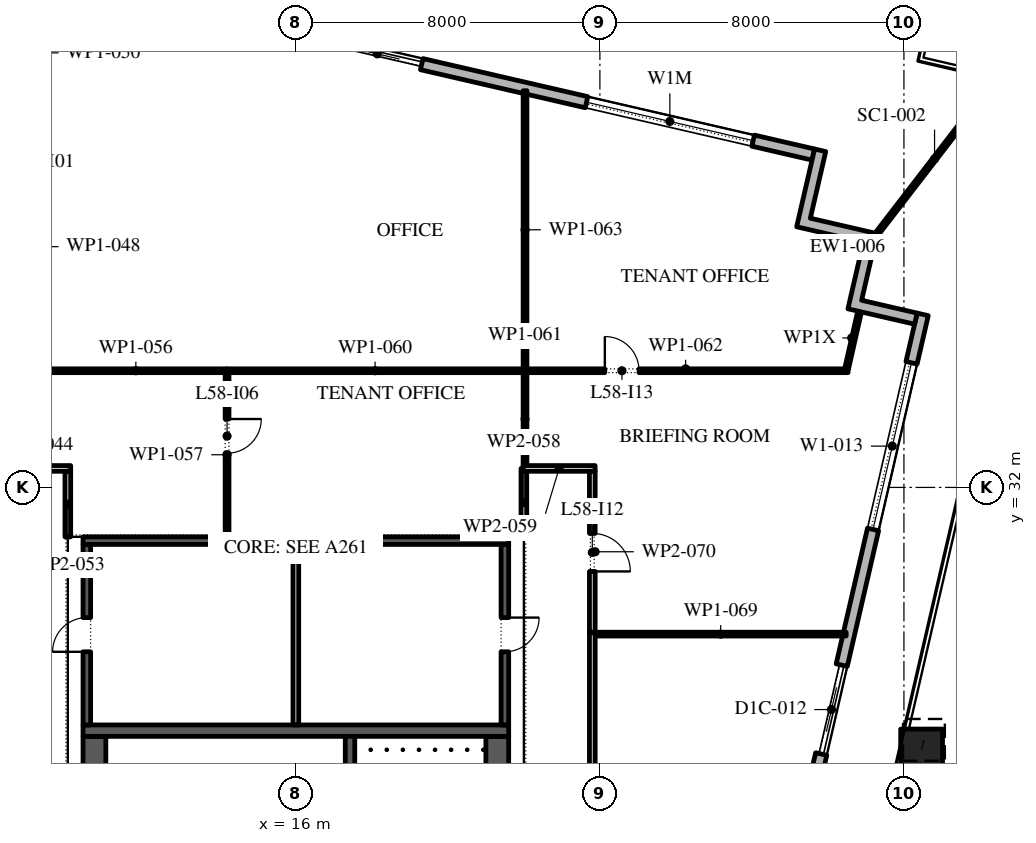
"""IFC4 building model, lengths in metres.
Left out: names, types, materials, properties, quantities, classifications, styles, units other than length and angle.
Written with IfcOpenShell. Run it as: python <this file> out.ifc"""

import sys

from ifc_helpers import new_model, si_unit, direction, frame, frame_2d, origin, origin_2d, place, context, subcontext, project, spatial, polyline, rectangle, outline, extrude, element, fill, save


model = new_model("IFC4")
c1 = context("Model", 3, precision=1e-05, world=origin(), true_north=direction((0.0, 1.0)))
c2 = subcontext(c1, "Body", "Model", "MODEL_VIEW")
j1 = project(units=[si_unit("LENGTHUNIT", "METRE"), si_unit("PLANEANGLEUNIT", "RADIAN")], contexts=[c1])
p1 = place(None, origin())
s1 = spatial("IfcSite", under=j1, at=p1, CompositionType="ELEMENT")
p2 = place(p1, origin())
s2 = spatial("IfcBuilding", under=s1, at=p2, CompositionType="ELEMENT")
p3 = place(p2, frame((0.0, 0.0, 268.2)))
s3 = spatial("IfcBuildingStorey", under=s2, at=p3, CompositionType="ELEMENT", Elevation=268.2)
p4 = place(p3, frame((32.465, 25.092, 0.0), z_axis=(0.014617783326, 0.063169706518, 0.99789574034), x_axis=(-0.974255315496, 0.225447511024, 0.0)))
e1 = element("IfcColumn", 1, at=p4, inside=s3, PredefinedType="COLUMN", context=c2, shape_type="SweptSolid", body=[
    extrude(rectangle(XDim=1.1, YDim=1.1, at=origin_2d()), origin(), (0.0, 0.0, 1.0), 4.209),
])
p5 = place(p3, frame((21.359, -11.678, 0.0), z_axis=(0.0, 0.0, 1.0), x_axis=(0.224949198343, 0.974370493275, 0.0)))
e2 = element("IfcWall", 2, at=p5, inside=s3, PredefinedType="STANDARD", context=c2, shape_type="SweptSolid", body=[
    extrude(rectangle(XDim=49.5, YDim=0.3, at=frame_2d((24.75, 0.0))), origin(), (0.0, 0.0, 1.0), 4.0),
])
p6 = place(p5, frame((1.157, 0.0, 0.45)))
e3 = element("IfcOpeningElement", 3, at=p6, cuts=e2, PredefinedType="OPENING", context=c2, shape_type="SweptSolid", body=[
    extrude(rectangle(XDim=4.5, YDim=3.05, at=frame_2d((2.25, 1.525))), frame((0.0, 0.16, 0.0), z_axis=(0.0, -1.0, 0.0), x_axis=(1.0, 0.0, 0.0)), (0.0, 0.0, 1.0), 0.32),
])
p7 = place(p5, frame((8.121, 0.0, 0.45)))
e4 = element("IfcOpeningElement", 4, at=p7, cuts=e2, PredefinedType="OPENING", context=c2, shape_type="SweptSolid", body=[
    extrude(rectangle(XDim=4.5, YDim=3.05, at=frame_2d((2.25, 1.525))), frame((0.0, 0.16, 0.0), z_axis=(0.0, -1.0, 0.0), x_axis=(1.0, 0.0, 0.0)), (0.0, 0.0, 1.0), 0.32),
])
p8 = place(p5, frame((15.236, 0.0, 0.45)))
e5 = element("IfcOpeningElement", 5, at=p8, cuts=e2, PredefinedType="OPENING", context=c2, shape_type="SweptSolid", body=[
    extrude(rectangle(XDim=4.5, YDim=3.05, at=frame_2d((2.25, 1.525))), frame((0.0, 0.16, 0.0), z_axis=(0.0, -1.0, 0.0), x_axis=(1.0, 0.0, 0.0)), (0.0, 0.0, 1.0), 0.32),
])
p9 = place(p5, frame((22.35, 0.0, 0.45)))
e6 = element("IfcOpeningElement", 6, at=p9, cuts=e2, PredefinedType="OPENING", context=c2, shape_type="SweptSolid", body=[
    extrude(rectangle(XDim=4.5, YDim=3.05, at=frame_2d((2.25, 1.525))), frame((0.0, 0.16, 0.0), z_axis=(0.0, -1.0, 0.0), x_axis=(1.0, 0.0, 0.0)), (0.0, 0.0, 1.0), 0.32),
])
p10 = place(p5, frame((29.464, 0.0, 0.45)))
e7 = element("IfcOpeningElement", 7, at=p10, cuts=e2, PredefinedType="OPENING", context=c2, shape_type="SweptSolid", body=[
    extrude(rectangle(XDim=4.5, YDim=2.95, at=frame_2d((2.25, 1.475))), frame((0.0, 0.16, 0.0), z_axis=(0.0, -1.0, 0.0), x_axis=(1.0, 0.0, 0.0)), (0.0, 0.0, 1.0), 0.32),
])
p11 = place(p5, frame((37.628, 0.0, 0.0)))
e8 = element("IfcOpeningElement", 8, at=p11, cuts=e2, PredefinedType="OPENING", context=c2, shape_type="SweptSolid", body=[
    extrude(rectangle(XDim=2.4, YDim=3.325, at=frame_2d((1.2, 1.663))), frame((0.0, 0.16, 0.0), z_axis=(0.0, -1.0, 0.0), x_axis=(1.0, 0.0, 0.0)), (0.0, 0.0, 1.0), 0.32),
])
p12 = place(p5, frame((43.693, 0.0, 0.45)))
e9 = element("IfcOpeningElement", 9, at=p12, cuts=e2, PredefinedType="OPENING", context=c2, shape_type="SweptSolid", body=[
    extrude(rectangle(XDim=4.5, YDim=3.05, at=frame_2d((2.25, 1.525))), frame((0.0, 0.16, 0.0), z_axis=(0.0, -1.0, 0.0), x_axis=(1.0, 0.0, 0.0)), (0.0, 0.0, 1.0), 0.32),
])
p13 = place(p3, frame((29.616, 40.758, 0.0), z_axis=(0.0, 0.0, 1.0), x_axis=(-0.974370532314, 0.224949029246, 0.0)))
e10 = element("IfcWall", 10, at=p13, inside=s3, PredefinedType="STANDARD", context=c2, shape_type="SweptSolid", body=[
    extrude(rectangle(XDim=48.0, YDim=0.3, at=frame_2d((24.0, 0.0))), origin(), (0.0, 0.0, 1.0), 4.0),
])
p14 = place(p13, frame((1.625, 0.0, 0.45)))
e11 = element("IfcOpeningElement", 11, at=p14, cuts=e10, PredefinedType="OPENING", context=c2, shape_type="SweptSolid", body=[
    extrude(rectangle(XDim=4.5, YDim=2.575, at=frame_2d((2.25, 1.288))), frame((0.0, 0.16, 0.0), z_axis=(0.0, -1.0, 0.0), x_axis=(1.0, 0.0, 0.0)), (0.0, 0.0, 1.0), 0.32),
])
p15 = place(p13, frame((10.575, 0.0, 0.0)))
e12 = element("IfcOpeningElement", 12, at=p15, cuts=e10, PredefinedType="OPENING", context=c2, shape_type="SweptSolid", body=[
    extrude(rectangle(XDim=2.4, YDim=3.5, at=frame_2d((1.2, 1.75))), frame((0.0, 0.16, 0.0), z_axis=(0.0, -1.0, 0.0), x_axis=(1.0, 0.0, 0.0)), (0.0, 0.0, 1.0), 0.32),
])
p16 = place(p13, frame((17.575, 0.0, 0.45)))
e13 = element("IfcOpeningElement", 13, at=p16, cuts=e10, PredefinedType="OPENING", context=c2, shape_type="SweptSolid", body=[
    extrude(rectangle(XDim=4.5, YDim=2.45, at=frame_2d((2.25, 1.225))), frame((0.0, 0.16, 0.0), z_axis=(0.0, -1.0, 0.0), x_axis=(1.0, 0.0, 0.0)), (0.0, 0.0, 1.0), 0.32),
])
p17 = place(p13, frame((25.625, 0.0, 0.45)))
e14 = element("IfcOpeningElement", 14, at=p17, cuts=e10, PredefinedType="OPENING", context=c2, shape_type="SweptSolid", body=[
    extrude(rectangle(XDim=4.5, YDim=2.45, at=frame_2d((2.25, 1.225))), frame((0.0, 0.16, 0.0), z_axis=(0.0, -1.0, 0.0), x_axis=(1.0, 0.0, 0.0)), (0.0, 0.0, 1.0), 0.32),
])
p18 = place(p13, frame((33.675, 0.0, 0.45)))
e15 = element("IfcOpeningElement", 15, at=p18, cuts=e10, PredefinedType="OPENING", context=c2, shape_type="SweptSolid", body=[
    extrude(rectangle(XDim=4.5, YDim=2.45, at=frame_2d((2.25, 1.225))), frame((0.0, 0.16, 0.0), z_axis=(0.0, -1.0, 0.0), x_axis=(1.0, 0.0, 0.0)), (0.0, 0.0, 1.0), 0.32),
])
p19 = place(p13, frame((42.175, 0.0, 0.0)))
e16 = element("IfcOpeningElement", 16, at=p19, cuts=e10, PredefinedType="OPENING", context=c2, shape_type="SweptSolid", body=[
    extrude(rectangle(XDim=2.4, YDim=3.5, at=frame_2d((1.2, 1.75))), frame((0.0, 0.16, 0.0), z_axis=(0.0, -1.0, 0.0), x_axis=(1.0, 0.0, 0.0)), (0.0, 0.0, 1.0), 0.32),
])
p20 = place(p3, origin())
e17 = element("IfcWall", 17, at=p20, inside=s3, PredefinedType="STANDARD", context=c2, shape_type="SweptSolid", body=[
    extrude(outline(polyline([(30.931, 38.453), (29.177, 38.858), (29.65, 40.905), (29.942, 40.837), (29.537, 39.083), (31.291, 38.678), (30.886, 36.924), (32.348, 36.587), (32.28, 36.295), (30.526, 36.699), (30.931, 38.453)])), origin(), (0.0, 0.0, 1.0), 4.0),
])
p21 = place(p3, frame((31.291, 38.678, -0.05), z_axis=(0.0, 0.0, 1.0), x_axis=(0.610487929458, 0.792025560185, 0.0)))
e18 = element("IfcWall", 18, at=p21, inside=s3, PredefinedType="STANDARD", context=c2, shape_type="SweptSolid", body=[
    extrude(rectangle(XDim=4.962, YDim=0.1, at=frame_2d((2.481, 0.0))), origin(), (0.0, 0.0, 1.0), 4.05),
])
p22 = place(p3, frame((21.3, -2.45, 0.0), z_axis=(0.0, 0.0, 1.0), x_axis=(0.0, 1.0, 0.0)))
e19 = element("IfcWall", 19, at=p22, inside=s3, PredefinedType="SHEAR", context=c2, shape_type="SweptSolid", body=[
    extrude(rectangle(XDim=27.9, YDim=0.6, at=frame_2d((13.95, 0.0))), origin(), (0.0, 0.0, 1.0), 4.0),
])
p23 = place(p22, frame((5.05, 0.0, 0.0)))
e20 = element("IfcOpeningElement", 20, at=p23, cuts=e19, PredefinedType="OPENING", context=c2, shape_type="SweptSolid", body=[
    extrude(rectangle(XDim=1.2, YDim=2.1, at=frame_2d((0.6, 1.05))), frame((0.0, 0.31, 0.0), z_axis=(0.0, -1.0, 0.0), x_axis=(1.0, 0.0, 0.0)), (0.0, 0.0, 1.0), 0.62),
])
p24 = place(p22, frame((21.65, 0.0, 0.0)))
e21 = element("IfcOpeningElement", 21, at=p24, cuts=e19, PredefinedType="OPENING", context=c2, shape_type="SweptSolid", body=[
    extrude(rectangle(XDim=1.2, YDim=2.1, at=frame_2d((0.6, 1.05))), frame((0.0, 0.31, 0.0), z_axis=(0.0, -1.0, 0.0), x_axis=(1.0, 0.0, 0.0)), (0.0, 0.0, 1.0), 0.62),
])
p25 = place(p3, frame((10.7, -2.45, 0.0), z_axis=(0.0, 0.0, 1.0), x_axis=(0.0, 1.0, 0.0)))
e22 = element("IfcWall", 22, at=p25, inside=s3, PredefinedType="SHEAR", context=c2, shape_type="SweptSolid", body=[
    extrude(rectangle(XDim=27.9, YDim=0.6, at=frame_2d((13.95, 0.0))), origin(), (0.0, 0.0, 1.0), 4.0),
])
p26 = place(p25, frame((23.65, 0.0, 0.0)))
e23 = element("IfcOpeningElement", 23, at=p26, cuts=e22, PredefinedType="OPENING", context=c2, shape_type="SweptSolid", body=[
    extrude(rectangle(XDim=2.4, YDim=2.1, at=frame_2d((1.2, 1.05))), frame((0.0, 0.31, 0.0), z_axis=(0.0, -1.0, 0.0), x_axis=(1.0, 0.0, 0.0)), (0.0, 0.0, 1.0), 0.62),
])
p27 = place(p25, frame((1.087, 0.0, 0.0)))
e24 = element("IfcOpeningElement", 24, at=p27, cuts=e22, PredefinedType="OPENING", context=c2, shape_type="SweptSolid", body=[
    extrude(rectangle(XDim=0.9, YDim=2.1, at=frame_2d((0.45, 1.05))), frame((0.0, 0.31, 0.0), z_axis=(0.0, -1.0, 0.0), x_axis=(1.0, 0.0, 0.0)), (0.0, 0.0, 1.0), 0.62),
])
p28 = place(p25, frame((4.262, 0.0, 0.0)))
e25 = element("IfcOpeningElement", 25, at=p28, cuts=e22, PredefinedType="OPENING", context=c2, shape_type="SweptSolid", body=[
    extrude(rectangle(XDim=1.0, YDim=2.1, at=frame_2d((0.5, 1.05))), frame((0.0, 0.31, 0.0), z_axis=(0.0, -1.0, 0.0), x_axis=(1.0, 0.0, 0.0)), (0.0, 0.0, 1.0), 0.62),
])
p29 = place(p3, frame((10.4, 25.6, 0.0), z_axis=(0.0, 0.0, 1.0), x_axis=(1.0, 0.0, 0.0)))
e26 = element("IfcWall", 26, at=p29, inside=s3, PredefinedType="SHEAR", context=c2, shape_type="SweptSolid", body=[
    extrude(rectangle(XDim=11.2, YDim=0.3, at=frame_2d((5.6, 0.0))), origin(), (0.0, 0.0, 1.0), 4.0),
])
p30 = place(p3, frame((17.425, 19.15, 0.0), z_axis=(0.0, 0.0, 1.0), x_axis=(0.0, 1.0, 0.0)))
e27 = element("IfcWall", 27, at=p30, inside=s3, PredefinedType="SHEAR", context=c2, shape_type="SweptSolid", body=[
    extrude(rectangle(XDim=6.3, YDim=0.25, at=frame_2d((3.15, 0.0))), origin(), (0.0, 0.0, 1.0), 4.0),
])
p31 = place(p30, frame((0.05, 0.0, 0.0)))
e28 = element("IfcOpeningElement", 28, at=p31, cuts=e27, PredefinedType="OPENING", context=c2, shape_type="SweptSolid", body=[
    extrude(rectangle(XDim=1.2, YDim=2.1, at=frame_2d((0.6, 1.05))), frame((0.0, 0.135, 0.0), z_axis=(0.0, -1.0, 0.0), x_axis=(1.0, 0.0, 0.0)), (0.0, 0.0, 1.0), 0.27),
])
p32 = place(p3, frame((21.5, 25.75, 0.0), z_axis=(0.0, 0.0, 1.0), x_axis=(0.0, 1.0, 0.0)))
e29 = element("IfcWall", 29, at=p32, inside=s3, PredefinedType="SHEAR", context=c2, shape_type="SweptSolid", body=[
    extrude(rectangle(XDim=4.75, YDim=0.2, at=frame_2d((2.375, 0.0))), origin(), (0.0, 0.0, 1.0), 4.0),
])
p33 = place(p32, frame((1.925, 0.0, 0.0)))
e30 = element("IfcOpeningElement", 30, at=p33, cuts=e29, PredefinedType="OPENING", context=c2, shape_type="SweptSolid", body=[
    extrude(rectangle(XDim=0.9, YDim=2.1, at=frame_2d((0.45, 1.05))), frame((0.0, 0.11, 0.0), z_axis=(0.0, -1.0, 0.0), x_axis=(1.0, 0.0, 0.0)), (0.0, 0.0, 1.0), 0.22),
])
p34 = place(p3, frame((10.5, 25.75, 0.0), z_axis=(0.0, 0.0, 1.0), x_axis=(0.0, 1.0, 0.0)))
e31 = element("IfcWall", 31, at=p34, inside=s3, PredefinedType="SHEAR", context=c2, shape_type="SweptSolid", body=[
    extrude(rectangle(XDim=4.75, YDim=0.2, at=frame_2d((2.375, 0.0))), origin(), (0.0, 0.0, 1.0), 4.0),
])
p35 = place(p34, frame((1.925, 0.0, 0.0)))
e32 = element("IfcOpeningElement", 32, at=p35, cuts=e31, PredefinedType="OPENING", context=c2, shape_type="SweptSolid", body=[
    extrude(rectangle(XDim=0.9, YDim=2.1, at=frame_2d((0.45, 1.05))), frame((0.0, 0.11, 0.0), z_axis=(0.0, -1.0, 0.0), x_axis=(1.0, 0.0, 0.0)), (0.0, 0.0, 1.0), 0.22),
])
p36 = place(p3, frame((10.4, 30.6, 0.0), z_axis=(0.0, 0.0, 1.0), x_axis=(1.0, 0.0, 0.0)))
e33 = element("IfcWall", 33, at=p36, inside=s3, PredefinedType="SHEAR", context=c2, shape_type="SweptSolid", body=[
    extrude(rectangle(XDim=11.2, YDim=0.2, at=frame_2d((5.6, 0.0))), origin(), (0.0, 0.0, 1.0), 4.0),
])
p37 = place(p3, frame((16.0, 25.75, 0.0), z_axis=(0.0, 0.0, 1.0), x_axis=(0.0, 1.0, 0.0)))
e34 = element("IfcWall", 34, at=p37, inside=s3, PredefinedType="PARTITIONING", context=c2, shape_type="SweptSolid", body=[
    extrude(rectangle(XDim=4.75, YDim=0.15, at=frame_2d((2.375, 0.0))), origin(), (0.0, 0.0, 1.0), 4.0),
])
p38 = place(p3, frame((8.275, 32.5, 0.0), z_axis=(0.0, 0.0, 1.0), x_axis=(1.0, 0.0, 0.0)))
e35 = element("IfcWall", 35, at=p38, inside=s3, PredefinedType="PARTITIONING", context=c2, shape_type="SweptSolid", body=[
    extrude(rectangle(XDim=1.8, YDim=0.15, at=frame_2d((0.9, 0.0))), origin(), (0.0, 0.0, 1.0), 4.0),
])
p39 = place(p3, frame((10.0, 32.425, 0.0), z_axis=(0.0, 0.0, 1.0), x_axis=(0.0, -1.0, 0.0)))
e36 = element("IfcWall", 36, at=p39, inside=s3, PredefinedType="PARTITIONING", context=c2, shape_type="SweptSolid", body=[
    extrude(rectangle(XDim=1.725, YDim=0.15, at=frame_2d((0.863, 0.0))), origin(), (0.0, 0.0, 1.0), 4.0),
])
p40 = place(p3, frame((14.19, 35.07, 0.0), z_axis=(0.0, 0.0, 1.0), x_axis=(-1.0, 0.0, 0.0)))
e37 = element("IfcWall", 37, at=p40, inside=s3, PredefinedType="PARTITIONING", context=c2, shape_type="SweptSolid", body=[
    extrude(rectangle(XDim=4.8, YDim=0.1, at=frame_2d((2.4, 0.0))), origin(), (0.0, 0.0, 1.0), 4.0),
])
p41 = place(p3, frame((14.19, 35.02, 0.0), z_axis=(0.0, 0.0, 1.0), x_axis=(0.0, -1.0, 0.0)))
e38 = element("IfcWall", 38, at=p41, inside=s3, PredefinedType="PARTITIONING", context=c2, shape_type="SweptSolid", body=[
    extrude(rectangle(XDim=4.32, YDim=0.1, at=frame_2d((2.16, 0.0))), origin(), (0.0, 0.0, 1.0), 4.0),
])
p42 = place(p41, frame((1.22, 0.0, 0.0)))
e39 = element("IfcOpeningElement", 39, at=p42, cuts=e38, PredefinedType="OPENING", context=c2, shape_type="SweptSolid", body=[
    extrude(rectangle(XDim=0.9, YDim=2.1, at=frame_2d((0.45, 1.05))), frame((0.0, 0.06, 0.0), z_axis=(0.0, -1.0, 0.0), x_axis=(1.0, 0.0, 0.0)), (0.0, 0.0, 1.0), 0.12),
])
p43 = place(p3, frame((22.0, 30.7, 0.0), z_axis=(0.0, 0.0, 1.0), x_axis=(0.0, 1.0, 0.0)))
e40 = element("IfcWall", 40, at=p43, inside=s3, PredefinedType="PARTITIONING", context=c2, shape_type="SweptSolid", body=[
    extrude(rectangle(XDim=1.8, YDim=0.15, at=frame_2d((0.9, 0.0))), origin(), (0.0, 0.0, 1.0), 4.0),
])
p44 = place(p3, frame((21.98, 32.5, 0.0), z_axis=(0.0, 0.0, 1.0), x_axis=(1.0, 0.0, 0.0)))
e41 = element("IfcWall", 41, at=p44, inside=s3, PredefinedType="PARTITIONING", context=c2, shape_type="SweptSolid", body=[
    extrude(rectangle(XDim=1.895, YDim=0.15, at=frame_2d((0.948, 0.0))), origin(), (0.0, 0.0, 1.0), 4.0),
])
p45 = place(p3, frame((21.98, 35.07, 0.0), z_axis=(0.0, 0.0, 1.0), x_axis=(-1.0, 0.0, 0.0)))
e42 = element("IfcWall", 42, at=p45, inside=s3, PredefinedType="PARTITIONING", context=c2, shape_type="SweptSolid", body=[
    extrude(rectangle(XDim=7.79, YDim=0.1, at=frame_2d((3.895, 0.0))), origin(), (0.0, 0.0, 1.0), 4.0),
])
p46 = place(p3, frame((22.03, 35.02, 0.0), z_axis=(0.0, 0.0, 1.0), x_axis=(0.0, -1.0, 0.0)))
e43 = element("IfcWall", 43, at=p46, inside=s3, PredefinedType="PARTITIONING", context=c2, shape_type="SweptSolid", body=[
    extrude(rectangle(XDim=2.445, YDim=0.1, at=frame_2d((1.223, 0.0))), origin(), (0.0, 0.0, 1.0), 4.0),
])
p47 = place(p3, frame((21.98, 35.07, 0.0), z_axis=(0.0, 0.0, 1.0), x_axis=(1.0, 0.0, 0.0)))
e44 = element("IfcWall", 44, at=p47, inside=s3, PredefinedType="PARTITIONING", context=c2, shape_type="SweptSolid", body=[
    extrude(rectangle(XDim=8.55, YDim=0.1, at=frame_2d((4.275, 0.0))), origin(), (0.0, 0.0, 1.0), 4.0),
])
p48 = place(p47, frame((2.15, 0.0, 0.0)))
e45 = element("IfcOpeningElement", 45, at=p48, cuts=e44, PredefinedType="OPENING", context=c2, shape_type="SweptSolid", body=[
    extrude(rectangle(XDim=0.9, YDim=2.1, at=frame_2d((0.45, 1.05))), frame((0.0, 0.06, 0.0), z_axis=(0.0, -1.0, 0.0), x_axis=(1.0, 0.0, 0.0)), (0.0, 0.0, 1.0), 0.12),
])
p49 = place(p3, frame((22.03, 42.438, 0.0), z_axis=(0.0, 0.0, 1.0), x_axis=(0.0, -1.0, 0.0)))
e46 = element("IfcWall", 46, at=p49, inside=s3, PredefinedType="PARTITIONING", context=c2, shape_type="SweptSolid", body=[
    extrude(rectangle(XDim=7.318, YDim=0.1, at=frame_2d((3.659, 0.0))), origin(), (0.0, 0.0, 1.0), 4.0),
])
p50 = place(p3, frame((23.8, 28.19, 0.0), z_axis=(0.0, 0.0, 1.0), x_axis=(0.0, -1.0, 0.0)))
e47 = element("IfcWall", 47, at=p50, inside=s3, PredefinedType="PARTITIONING", context=c2, shape_type="SweptSolid", body=[
    extrude(rectangle(XDim=12.35, YDim=0.15, at=frame_2d((6.175, 0.0))), origin(), (0.0, 0.0, 1.0), 4.0),
])
p51 = place(p50, frame((8.25, 0.0, 0.0)))
e48 = element("IfcOpeningElement", 48, at=p51, cuts=e47, PredefinedType="OPENING", context=c2, shape_type="SweptSolid", body=[
    extrude(rectangle(XDim=1.0, YDim=2.1, at=frame_2d((0.5, 1.05))), frame((0.0, 0.085, 0.0), z_axis=(0.0, -1.0, 0.0), x_axis=(1.0, 0.0, 0.0)), (0.0, 0.0, 1.0), 0.17),
])
p52 = place(p3, frame((23.875, 28.14, 0.0), z_axis=(0.0, 0.0, 1.0), x_axis=(1.0, 0.0, 0.0)))
e49 = element("IfcWall", 49, at=p52, inside=s3, PredefinedType="PARTITIONING", context=c2, shape_type="SweptSolid", body=[
    extrude(rectangle(XDim=6.605, YDim=0.1, at=frame_2d((3.302, 0.0))), origin(), (0.0, 0.0, 1.0), 4.0),
])
p53 = place(p3, frame((23.8, 32.425, 0.0), z_axis=(0.0, 0.0, 1.0), x_axis=(0.0, -1.0, 0.0)))
e50 = element("IfcWall", 50, at=p53, inside=s3, PredefinedType="PARTITIONING", context=c2, shape_type="SweptSolid", body=[
    extrude(rectangle(XDim=4.235, YDim=0.15, at=frame_2d((2.118, 0.0))), origin(), (0.0, 0.0, 1.0), 4.0),
])
p54 = place(p53, frame((1.635, 0.0, 0.0)))
e51 = element("IfcOpeningElement", 51, at=p54, cuts=e50, PredefinedType="OPENING", context=c2, shape_type="SweptSolid", body=[
    extrude(rectangle(XDim=1.0, YDim=2.1, at=frame_2d((0.5, 1.05))), frame((0.0, 0.085, 0.0), z_axis=(0.0, -1.0, 0.0), x_axis=(1.0, 0.0, 0.0)), (0.0, 0.0, 1.0), 0.17),
])
p55 = place(p3, frame((30.491, 35.119, 0.0), z_axis=(0.0, 0.0, 1.0), x_axis=(0.221461033886, 0.975169221453, 0.0)))
e52 = element("IfcWall", 52, at=p55, inside=s3, PredefinedType="PARTITIONING", context=c2, shape_type="SweptSolid", body=[
    extrude(rectangle(XDim=1.648, YDim=0.1, at=frame_2d((0.824, 0.0))), origin(), (0.0, 0.0, 1.0), 3.246),
])
p56 = place(p11, origin())
e53 = element("IfcDoor", 53, at=p56, inside=s3, OperationType="DOUBLE_DOOR_SLIDING", PredefinedType="DOOR", context=c2, shape_type="SweptSolid", body=[
    extrude(rectangle(XDim=2.4, YDim=3.325, at=frame_2d((1.2, 1.663))), frame((0.0, 0.025, 0.0), z_axis=(0.0, -1.0, 0.0), x_axis=(1.0, 0.0, 0.0)), (0.0, 0.0, 1.0), 0.05),
])
fill(e8, e53)
p57 = place(p12, origin())
e54 = element("IfcWindow", 54, at=p57, inside=s3, PartitioningType="DOUBLE_PANEL_VERTICAL", PredefinedType="WINDOW", context=c2, shape_type="SweptSolid", body=[
    extrude(rectangle(XDim=4.5, YDim=3.05, at=frame_2d((2.25, 1.525))), frame((0.0, 0.03, 0.0), z_axis=(0.0, -1.0, 0.0), x_axis=(1.0, 0.0, 0.0)), (0.0, 0.0, 1.0), 0.06),
])
fill(e9, e54)
p58 = place(p14, origin())
e55 = element("IfcWindow", 55, at=p58, inside=s3, PartitioningType="DOUBLE_PANEL_VERTICAL", PredefinedType="WINDOW", context=c2, shape_type="SweptSolid", body=[
    extrude(rectangle(XDim=4.5, YDim=2.575, at=frame_2d((2.25, 1.288))), frame((0.0, 0.03, 0.0), z_axis=(0.0, -1.0, 0.0), x_axis=(1.0, 0.0, 0.0)), (0.0, 0.0, 1.0), 0.06),
])
fill(e11, e55)
p59 = place(p15, origin())
e56 = element("IfcDoor", 56, at=p59, inside=s3, OperationType="DOUBLE_DOOR_SLIDING", PredefinedType="DOOR", context=c2, shape_type="SweptSolid", body=[
    extrude(rectangle(XDim=2.4, YDim=3.5, at=frame_2d((1.2, 1.75))), frame((0.0, 0.025, 0.0), z_axis=(0.0, -1.0, 0.0), x_axis=(1.0, 0.0, 0.0)), (0.0, 0.0, 1.0), 0.05),
])
fill(e12, e56)
p60 = place(p33, frame((0.9, 0.15, 0.0), z_axis=(0.0, 0.0, 1.0), x_axis=(-1.0, 0.0, 0.0)))
e57 = element("IfcDoor", 57, at=p60, inside=s3, OperationType="SINGLE_SWING_RIGHT", PredefinedType="DOOR", context=c2, shape_type="SweptSolid", body=[
    extrude(rectangle(XDim=0.9, YDim=2.1, at=frame_2d((0.45, 1.05))), frame((0.0, 0.1, 0.0), z_axis=(0.0, -1.0, 0.0), x_axis=(1.0, 0.0, 0.0)), (0.0, 0.0, 1.0), 0.05),
])
fill(e30, e57)
p61 = place(p35, origin())
e58 = element("IfcDoor", 58, at=p61, inside=s3, OperationType="SINGLE_SWING_RIGHT", PredefinedType="DOOR", context=c2, shape_type="SweptSolid", body=[
    extrude(rectangle(XDim=0.9, YDim=2.1, at=frame_2d((0.45, 1.05))), frame((0.0, -0.05, 0.0), z_axis=(0.0, -1.0, 0.0), x_axis=(1.0, 0.0, 0.0)), (0.0, 0.0, 1.0), 0.05),
])
fill(e32, e58)
p62 = place(p42, origin())
e59 = element("IfcDoor", 59, at=p62, inside=s3, OperationType="SINGLE_SWING_RIGHT", PredefinedType="DOOR", context=c2, shape_type="SweptSolid", body=[
    extrude(rectangle(XDim=0.9, YDim=2.1, at=frame_2d((0.45, 1.05))), frame((0.0, 0.025, 0.0), z_axis=(0.0, -1.0, 0.0), x_axis=(1.0, 0.0, 0.0)), (0.0, 0.0, 1.0), 0.05),
])
fill(e39, e59)
p63 = place(p54, origin())
e60 = element("IfcDoor", 60, at=p63, inside=s3, OperationType="SINGLE_SWING_LEFT", PredefinedType="DOOR", context=c2, shape_type="SweptSolid", body=[
    extrude(rectangle(XDim=1.0, YDim=2.1, at=frame_2d((0.5, 1.05))), frame((0.0, 0.025, 0.0), z_axis=(0.0, -1.0, 0.0), x_axis=(1.0, 0.0, 0.0)), (0.0, 0.0, 1.0), 0.05),
])
fill(e51, e60)
p64 = place(p48, origin())
e61 = element("IfcDoor", 61, at=p64, inside=s3, OperationType="SINGLE_SWING_RIGHT", PredefinedType="DOOR", context=c2, shape_type="SweptSolid", body=[
    extrude(rectangle(XDim=0.9, YDim=2.1, at=frame_2d((0.45, 1.05))), frame((0.0, 0.025, 0.0), z_axis=(0.0, -1.0, 0.0), x_axis=(1.0, 0.0, 0.0)), (0.0, 0.0, 1.0), 0.05),
])
fill(e45, e61)
save(model, sys.argv[1])
